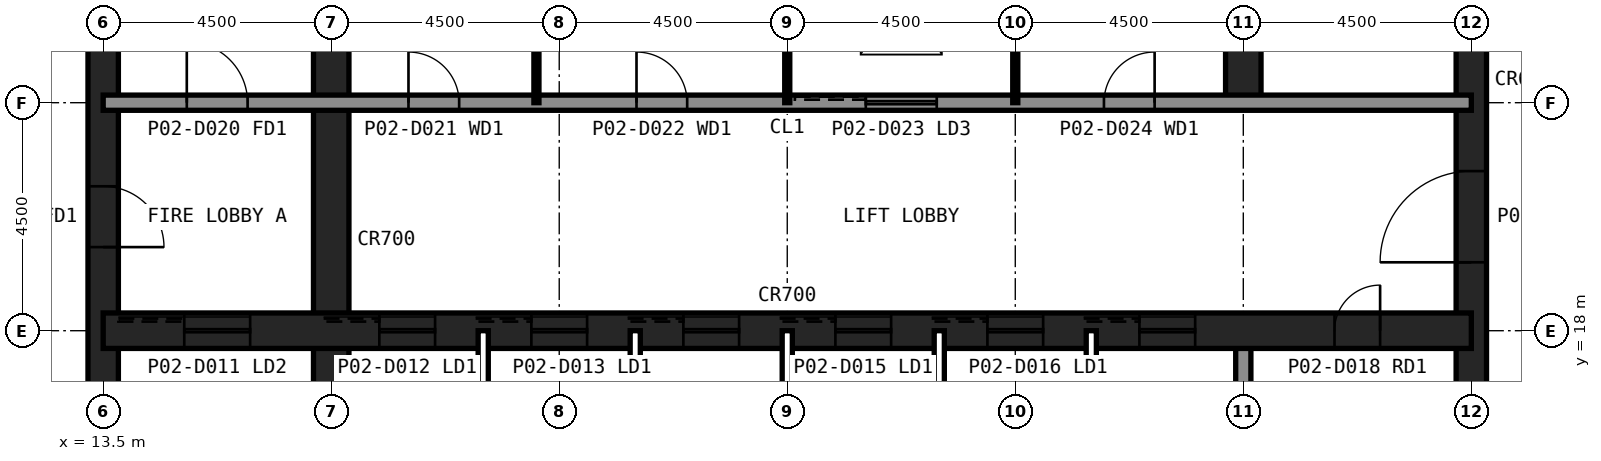
"""IFC4 building model, lengths in metres.
Left out: names, types, materials, properties, quantities, classifications, styles, units other than length and angle.
Written with IfcOpenShell. Run it as: python <this file> out.ifc"""

import sys

from ifc_helpers import new_model, si_unit, direction, frame, frame_2d, origin, place, context, subcontext, project, spatial, rectangle, extrude, element, fill, save


model = new_model("IFC4")
c1 = context("Model", 3, precision=1e-05, world=origin(), true_north=direction((0.0, 1.0)))
c2 = subcontext(c1, "Body", "Model", "MODEL_VIEW")
j1 = project(units=[si_unit("LENGTHUNIT", "METRE"), si_unit("PLANEANGLEUNIT", "RADIAN")], contexts=[c1])
p1 = place(None, origin())
s1 = spatial("IfcSite", under=j1, at=p1, CompositionType="ELEMENT")
p2 = place(p1, origin())
s2 = spatial("IfcBuilding", under=s1, at=p2, CompositionType="ELEMENT")
p3 = place(p2, frame((0.0, 0.0, 6.0)))
s3 = spatial("IfcBuildingStorey", under=s2, at=p3, CompositionType="ELEMENT", Elevation=6.0)
p4 = place(p3, frame((40.5, 13.5, 0.0), z_axis=(0.0, 0.0, 1.0), x_axis=(0.0, 1.0, 0.0)))
e1 = element("IfcWall", 1, at=p4, inside=s3, PredefinedType="SHEAR", context=c2, shape_type="SweptSolid", body=[
    extrude(rectangle(XDim=27.0, YDim=0.6, at=frame_2d((13.5, 0.0))), origin(), (0.0, 0.0, 1.0), 6.0),
])
p5 = place(p4, frame((5.85, 0.0, 0.0)))
e2 = element("IfcOpeningElement", 2, at=p5, cuts=e1, PredefinedType="OPENING", context=c2, shape_type="SweptSolid", body=[
    extrude(rectangle(XDim=1.8, YDim=2.1, at=frame_2d((0.9, 1.05))), frame((0.0, 0.31, 0.0), z_axis=(0.0, -1.0, 0.0), x_axis=(1.0, 0.0, 0.0)), (0.0, 0.0, 1.0), 0.62),
])
p6 = place(p4, frame((19.65, 0.0, 0.0)))
e3 = element("IfcOpeningElement", 3, at=p6, cuts=e1, PredefinedType="OPENING", context=c2, shape_type="SweptSolid", body=[
    extrude(rectangle(XDim=1.2, YDim=2.1, at=frame_2d((0.6, 1.05))), frame((0.0, 0.31, 0.0), z_axis=(0.0, -1.0, 0.0), x_axis=(1.0, 0.0, 0.0)), (0.0, 0.0, 1.0), 0.62),
])
p7 = place(p3, frame((13.5, 40.5, 0.0), z_axis=(0.0, 0.0, 1.0), x_axis=(0.0, -1.0, 0.0)))
e4 = element("IfcWall", 4, at=p7, inside=s3, PredefinedType="SHEAR", context=c2, shape_type="SweptSolid", body=[
    extrude(rectangle(XDim=27.0, YDim=0.6, at=frame_2d((13.5, 0.0))), origin(), (0.0, 0.0, 1.0), 6.0),
])
p8 = place(p7, frame((19.65, 0.0, 0.0)))
e5 = element("IfcOpeningElement", 5, at=p8, cuts=e4, PredefinedType="OPENING", context=c2, shape_type="SweptSolid", body=[
    extrude(rectangle(XDim=1.2, YDim=2.1, at=frame_2d((0.6, 1.05))), frame((0.0, 0.31, 0.0), z_axis=(0.0, -1.0, 0.0), x_axis=(1.0, 0.0, 0.0)), (0.0, 0.0, 1.0), 0.62),
])
p9 = place(p7, frame((5.85, 0.0, 0.0)))
e6 = element("IfcOpeningElement", 6, at=p9, cuts=e4, PredefinedType="OPENING", context=c2, shape_type="SweptSolid", body=[
    extrude(rectangle(XDim=1.8, YDim=2.1, at=frame_2d((0.9, 1.05))), frame((0.0, 0.31, 0.0), z_axis=(0.0, -1.0, 0.0), x_axis=(1.0, 0.0, 0.0)), (0.0, 0.0, 1.0), 0.62),
])
p10 = place(p3, frame((18.0, 13.5, 0.0), z_axis=(0.0, 0.0, 1.0), x_axis=(0.0, 1.0, 0.0)))
e7 = element("IfcWall", 7, at=p10, inside=s3, PredefinedType="SHEAR", context=c2, shape_type="SweptSolid", body=[
    extrude(rectangle(XDim=18.0, YDim=0.7, at=frame_2d((9.0, 0.0))), origin(), (0.0, 0.0, 1.0), 6.0),
])
p11 = place(p3, frame((36.0, 13.5, 0.0), z_axis=(0.0, 0.0, 1.0), x_axis=(0.0, 1.0, 0.0)))
e8 = element("IfcWall", 8, at=p11, inside=s3, PredefinedType="SOLIDWALL", context=c2, shape_type="SweptSolid", body=[
    extrude(rectangle(XDim=4.5, YDim=0.3, at=frame_2d((2.25, 0.0))), origin(), (0.0, 0.0, 1.0), 5.8),
])
p12 = place(p3, frame((36.0, 22.5, 0.0), z_axis=(0.0, 0.0, 1.0), x_axis=(0.0, 1.0, 0.0)))
e9 = element("IfcWall", 9, at=p12, inside=s3, PredefinedType="SHEAR", context=c2, shape_type="SweptSolid", body=[
    extrude(rectangle(XDim=18.0, YDim=0.7, at=frame_2d((9.0, 0.0))), origin(), (0.0, 0.0, 1.0), 6.0),
])
p13 = place(p3, frame((13.5, 18.0, 0.0), z_axis=(0.0, 0.0, 1.0), x_axis=(1.0, 0.0, 0.0)))
e10 = element("IfcWall", 10, at=p13, inside=s3, PredefinedType="SHEAR", context=c2, shape_type="SweptSolid", body=[
    extrude(rectangle(XDim=27.0, YDim=0.7, at=frame_2d((13.5, 0.0))), origin(), (0.0, 0.0, 1.0), 6.0),
])
p14 = place(p13, frame((24.3, 0.0, 0.0)))
e11 = element("IfcOpeningElement", 11, at=p14, cuts=e10, PredefinedType="OPENING", context=c2, shape_type="SweptSolid", body=[
    extrude(rectangle(XDim=0.9, YDim=2.1, at=frame_2d((0.45, 1.05))), frame((0.0, 0.36, 0.0), z_axis=(0.0, -1.0, 0.0), x_axis=(1.0, 0.0, 0.0)), (0.0, 0.0, 1.0), 0.72),
])
p15 = place(p13, frame((5.45, 0.0, 0.0)))
e12 = element("IfcOpeningElement", 12, at=p15, cuts=e10, PredefinedType="OPENING", context=c2, shape_type="SweptSolid", body=[
    extrude(rectangle(XDim=1.1, YDim=2.1, at=frame_2d((0.55, 1.05))), frame((0.0, 0.36, 0.0), z_axis=(0.0, -1.0, 0.0), x_axis=(1.0, 0.0, 0.0)), (0.0, 0.0, 1.0), 0.72),
])
p16 = place(p13, frame((8.45, 0.0, 0.0)))
e13 = element("IfcOpeningElement", 13, at=p16, cuts=e10, PredefinedType="OPENING", context=c2, shape_type="SweptSolid", body=[
    extrude(rectangle(XDim=1.1, YDim=2.1, at=frame_2d((0.55, 1.05))), frame((0.0, 0.36, 0.0), z_axis=(0.0, -1.0, 0.0), x_axis=(1.0, 0.0, 0.0)), (0.0, 0.0, 1.0), 0.72),
])
p17 = place(p13, frame((11.45, 0.0, 0.0)))
e14 = element("IfcOpeningElement", 14, at=p17, cuts=e10, PredefinedType="OPENING", context=c2, shape_type="SweptSolid", body=[
    extrude(rectangle(XDim=1.1, YDim=2.1, at=frame_2d((0.55, 1.05))), frame((0.0, 0.36, 0.0), z_axis=(0.0, -1.0, 0.0), x_axis=(1.0, 0.0, 0.0)), (0.0, 0.0, 1.0), 0.72),
])
p18 = place(p13, frame((14.45, 0.0, 0.0)))
e15 = element("IfcOpeningElement", 15, at=p18, cuts=e10, PredefinedType="OPENING", context=c2, shape_type="SweptSolid", body=[
    extrude(rectangle(XDim=1.1, YDim=2.1, at=frame_2d((0.55, 1.05))), frame((0.0, 0.36, 0.0), z_axis=(0.0, -1.0, 0.0), x_axis=(1.0, 0.0, 0.0)), (0.0, 0.0, 1.0), 0.72),
])
p19 = place(p13, frame((17.45, 0.0, 0.0)))
e16 = element("IfcOpeningElement", 16, at=p19, cuts=e10, PredefinedType="OPENING", context=c2, shape_type="SweptSolid", body=[
    extrude(rectangle(XDim=1.1, YDim=2.1, at=frame_2d((0.55, 1.05))), frame((0.0, 0.36, 0.0), z_axis=(0.0, -1.0, 0.0), x_axis=(1.0, 0.0, 0.0)), (0.0, 0.0, 1.0), 0.72),
])
p20 = place(p13, frame((20.45, 0.0, 0.0)))
e17 = element("IfcOpeningElement", 17, at=p20, cuts=e10, PredefinedType="OPENING", context=c2, shape_type="SweptSolid", body=[
    extrude(rectangle(XDim=1.1, YDim=2.1, at=frame_2d((0.55, 1.05))), frame((0.0, 0.36, 0.0), z_axis=(0.0, -1.0, 0.0), x_axis=(1.0, 0.0, 0.0)), (0.0, 0.0, 1.0), 0.72),
])
p21 = place(p13, frame((1.6, 0.0, 0.0)))
e18 = element("IfcOpeningElement", 18, at=p21, cuts=e10, PredefinedType="OPENING", context=c2, shape_type="SweptSolid", body=[
    extrude(rectangle(XDim=1.3, YDim=2.2, at=frame_2d((0.65, 1.1))), frame((0.0, 0.36, 0.0), z_axis=(0.0, -1.0, 0.0), x_axis=(1.0, 0.0, 0.0)), (0.0, 0.0, 1.0), 0.72),
])
p22 = place(p3, frame((13.5, 22.5, 0.0), z_axis=(0.0, 0.0, 1.0), x_axis=(1.0, 0.0, 0.0)))
e19 = element("IfcWall", 19, at=p22, inside=s3, PredefinedType="SOLIDWALL", context=c2, shape_type="SweptSolid", body=[
    extrude(rectangle(XDim=27.0, YDim=0.3, at=frame_2d((13.5, 0.0))), origin(), (0.0, 0.0, 1.0), 5.8),
])
p23 = place(p22, frame((1.65, 0.0, 0.0)))
e20 = element("IfcOpeningElement", 20, at=p23, cuts=e19, PredefinedType="OPENING", context=c2, shape_type="SweptSolid", body=[
    extrude(rectangle(XDim=1.2, YDim=2.1, at=frame_2d((0.6, 1.05))), frame((0.0, 0.16, 0.0), z_axis=(0.0, -1.0, 0.0), x_axis=(1.0, 0.0, 0.0)), (0.0, 0.0, 1.0), 0.32),
])
p24 = place(p22, frame((6.025, 0.0, 0.0)))
e21 = element("IfcOpeningElement", 21, at=p24, cuts=e19, PredefinedType="OPENING", context=c2, shape_type="SweptSolid", body=[
    extrude(rectangle(XDim=1.0, YDim=2.1, at=frame_2d((0.5, 1.05))), frame((0.0, 0.16, 0.0), z_axis=(0.0, -1.0, 0.0), x_axis=(1.0, 0.0, 0.0)), (0.0, 0.0, 1.0), 0.32),
])
p25 = place(p22, frame((10.525, 0.0, 0.0)))
e22 = element("IfcOpeningElement", 22, at=p25, cuts=e19, PredefinedType="OPENING", context=c2, shape_type="SweptSolid", body=[
    extrude(rectangle(XDim=1.0, YDim=2.1, at=frame_2d((0.5, 1.05))), frame((0.0, 0.16, 0.0), z_axis=(0.0, -1.0, 0.0), x_axis=(1.0, 0.0, 0.0)), (0.0, 0.0, 1.0), 0.32),
])
p26 = place(p22, frame((19.75, 0.0, 0.0)))
e23 = element("IfcOpeningElement", 23, at=p26, cuts=e19, PredefinedType="OPENING", context=c2, shape_type="SweptSolid", body=[
    extrude(rectangle(XDim=1.0, YDim=2.1, at=frame_2d((0.5, 1.05))), frame((0.0, 0.16, 0.0), z_axis=(0.0, -1.0, 0.0), x_axis=(1.0, 0.0, 0.0)), (0.0, 0.0, 1.0), 0.32),
])
p27 = place(p22, frame((15.05, 0.0, 0.0)))
e24 = element("IfcOpeningElement", 24, at=p27, cuts=e19, PredefinedType="OPENING", context=c2, shape_type="SweptSolid", body=[
    extrude(rectangle(XDim=1.4, YDim=2.4, at=frame_2d((0.7, 1.2))), frame((0.0, 0.16, 0.0), z_axis=(0.0, -1.0, 0.0), x_axis=(1.0, 0.0, 0.0)), (0.0, 0.0, 1.0), 0.32),
])
for number, where, z_axis, x_axis in (
    (25, (21.0, 13.5, 0.0), (0.0, 0.0, 1.0), (0.0, 1.0, 0.0)),
    (26, (24.0, 13.5, 0.0), (0.0, 0.0, 1.0), (0.0, 1.0, 0.0)),
    (27, (27.0, 13.5, 0.0), (0.0, 0.0, 1.0), (0.0, 1.0, 0.0)),
    (28, (30.0, 13.5, 0.0), (0.0, 0.0, 1.0), (0.0, 1.0, 0.0)),
    (29, (33.0, 13.5, 0.0), (0.0, 0.0, 1.0), (0.0, 1.0, 0.0)),
):
    element("IfcWall", number, at=place(p3, frame(where, z_axis=z_axis, x_axis=x_axis)), inside=s3, PredefinedType="PARTITIONING", context=c2, shape_type="SweptSolid", body=[
        extrude(rectangle(XDim=4.5, YDim=0.2, at=frame_2d((2.25, 0.0))), origin(), (0.0, 0.0, 1.0), 5.8),
    ])
for number, where, z_axis, x_axis in (
    (30, (22.05, 22.5, 0.0), (0.0, 0.0, 1.0), (0.0, 1.0, 0.0)),
    (31, (27.0, 22.5, 0.0), (0.0, 0.0, 1.0), (0.0, 1.0, 0.0)),
    (32, (31.5, 22.5, 0.0), (0.0, 0.0, 1.0), (0.0, 1.0, 0.0)),
):
    element("IfcWall", number, at=place(p3, frame(where, z_axis=z_axis, x_axis=x_axis)), inside=s3, PredefinedType="PLUMBINGWALL", context=c2, shape_type="SweptSolid", body=[
        extrude(rectangle(XDim=9.0, YDim=0.1, at=frame_2d((4.5, 0.0))), origin(), (0.0, 0.0, 1.0), 5.8),
    ])
p28 = place(p8, origin())
e33 = element("IfcDoor", 33, at=p28, inside=s3, OperationType="SINGLE_SWING_RIGHT", PredefinedType="DOOR", context=c2, shape_type="SweptSolid", body=[
    extrude(rectangle(XDim=1.2, YDim=2.1, at=frame_2d((0.6, 1.05))), frame((0.0, 0.025, 0.0), z_axis=(0.0, -1.0, 0.0), x_axis=(1.0, 0.0, 0.0)), (0.0, 0.0, 1.0), 0.05),
])
fill(e5, e33)
p29 = place(p5, origin())
e34 = element("IfcDoor", 34, at=p29, inside=s3, OperationType="SINGLE_SWING_LEFT", PredefinedType="DOOR", context=c2, shape_type="SweptSolid", body=[
    extrude(rectangle(XDim=1.8, YDim=2.1, at=frame_2d((0.9, 1.05))), frame((0.0, 0.025, 0.0), z_axis=(0.0, -1.0, 0.0), x_axis=(1.0, 0.0, 0.0)), (0.0, 0.0, 1.0), 0.05),
])
fill(e2, e34)
p30 = place(p23, origin())
e35 = element("IfcDoor", 35, at=p30, inside=s3, OperationType="SINGLE_SWING_LEFT", PredefinedType="DOOR", context=c2, shape_type="SweptSolid", body=[
    extrude(rectangle(XDim=1.2, YDim=2.1, at=frame_2d((0.6, 1.05))), frame((0.0, 0.025, 0.0), z_axis=(0.0, -1.0, 0.0), x_axis=(1.0, 0.0, 0.0)), (0.0, 0.0, 1.0), 0.05),
])
fill(e20, e35)
p31 = place(p24, origin())
e36 = element("IfcDoor", 36, at=p31, inside=s3, OperationType="SINGLE_SWING_LEFT", PredefinedType="DOOR", context=c2, shape_type="SweptSolid", body=[
    extrude(rectangle(XDim=1.0, YDim=2.1, at=frame_2d((0.5, 1.05))), frame((0.0, 0.025, 0.0), z_axis=(0.0, -1.0, 0.0), x_axis=(1.0, 0.0, 0.0)), (0.0, 0.0, 1.0), 0.05),
])
fill(e21, e36)
p32 = place(p25, origin())
e37 = element("IfcDoor", 37, at=p32, inside=s3, OperationType="SINGLE_SWING_LEFT", PredefinedType="DOOR", context=c2, shape_type="SweptSolid", body=[
    extrude(rectangle(XDim=1.0, YDim=2.1, at=frame_2d((0.5, 1.05))), frame((0.0, 0.025, 0.0), z_axis=(0.0, -1.0, 0.0), x_axis=(1.0, 0.0, 0.0)), (0.0, 0.0, 1.0), 0.05),
])
fill(e22, e37)
p33 = place(p26, origin())
e38 = element("IfcDoor", 38, at=p33, inside=s3, OperationType="SINGLE_SWING_RIGHT", PredefinedType="DOOR", context=c2, shape_type="SweptSolid", body=[
    extrude(rectangle(XDim=1.0, YDim=2.1, at=frame_2d((0.5, 1.05))), frame((0.0, 0.025, 0.0), z_axis=(0.0, -1.0, 0.0), x_axis=(1.0, 0.0, 0.0)), (0.0, 0.0, 1.0), 0.05),
])
fill(e23, e38)
p34 = place(p14, origin())
e39 = element("IfcDoor", 39, at=p34, inside=s3, OperationType="SINGLE_SWING_RIGHT", PredefinedType="DOOR", context=c2, shape_type="SweptSolid", body=[
    extrude(rectangle(XDim=0.9, YDim=2.1, at=frame_2d((0.45, 1.05))), frame((0.0, 0.025, 0.0), z_axis=(0.0, -1.0, 0.0), x_axis=(1.0, 0.0, 0.0)), (0.0, 0.0, 1.0), 0.05),
])
fill(e11, e39)
p35 = place(p15, origin())
e40 = element("IfcDoor", 40, at=p35, inside=s3, OperationType="SLIDING_TO_LEFT", PredefinedType="DOOR", context=c2, shape_type="SweptSolid", body=[
    extrude(rectangle(XDim=1.1, YDim=2.1, at=frame_2d((0.55, 1.05))), frame((0.0, 0.025, 0.0), z_axis=(0.0, -1.0, 0.0), x_axis=(1.0, 0.0, 0.0)), (0.0, 0.0, 1.0), 0.05),
])
fill(e12, e40)
p36 = place(p16, origin())
e41 = element("IfcDoor", 41, at=p36, inside=s3, OperationType="SLIDING_TO_LEFT", PredefinedType="DOOR", context=c2, shape_type="SweptSolid", body=[
    extrude(rectangle(XDim=1.1, YDim=2.1, at=frame_2d((0.55, 1.05))), frame((0.0, 0.025, 0.0), z_axis=(0.0, -1.0, 0.0), x_axis=(1.0, 0.0, 0.0)), (0.0, 0.0, 1.0), 0.05),
])
fill(e13, e41)
p37 = place(p17, origin())
e42 = element("IfcDoor", 42, at=p37, inside=s3, OperationType="SLIDING_TO_LEFT", PredefinedType="DOOR", context=c2, shape_type="SweptSolid", body=[
    extrude(rectangle(XDim=1.1, YDim=2.1, at=frame_2d((0.55, 1.05))), frame((0.0, 0.025, 0.0), z_axis=(0.0, -1.0, 0.0), x_axis=(1.0, 0.0, 0.0)), (0.0, 0.0, 1.0), 0.05),
])
fill(e14, e42)
p38 = place(p18, origin())
e43 = element("IfcDoor", 43, at=p38, inside=s3, OperationType="SLIDING_TO_LEFT", PredefinedType="DOOR", context=c2, shape_type="SweptSolid", body=[
    extrude(rectangle(XDim=1.1, YDim=2.1, at=frame_2d((0.55, 1.05))), frame((0.0, 0.025, 0.0), z_axis=(0.0, -1.0, 0.0), x_axis=(1.0, 0.0, 0.0)), (0.0, 0.0, 1.0), 0.05),
])
fill(e15, e43)
p39 = place(p19, origin())
e44 = element("IfcDoor", 44, at=p39, inside=s3, OperationType="SLIDING_TO_LEFT", PredefinedType="DOOR", context=c2, shape_type="SweptSolid", body=[
    extrude(rectangle(XDim=1.1, YDim=2.1, at=frame_2d((0.55, 1.05))), frame((0.0, 0.025, 0.0), z_axis=(0.0, -1.0, 0.0), x_axis=(1.0, 0.0, 0.0)), (0.0, 0.0, 1.0), 0.05),
])
fill(e16, e44)
p40 = place(p20, origin())
e45 = element("IfcDoor", 45, at=p40, inside=s3, OperationType="SLIDING_TO_LEFT", PredefinedType="DOOR", context=c2, shape_type="SweptSolid", body=[
    extrude(rectangle(XDim=1.1, YDim=2.1, at=frame_2d((0.55, 1.05))), frame((0.0, 0.025, 0.0), z_axis=(0.0, -1.0, 0.0), x_axis=(1.0, 0.0, 0.0)), (0.0, 0.0, 1.0), 0.05),
])
fill(e17, e45)
p41 = place(p21, origin())
e46 = element("IfcDoor", 46, at=p41, inside=s3, OperationType="SLIDING_TO_LEFT", PredefinedType="DOOR", context=c2, shape_type="SweptSolid", body=[
    extrude(rectangle(XDim=1.3, YDim=2.2, at=frame_2d((0.65, 1.1))), frame((0.0, 0.025, 0.0), z_axis=(0.0, -1.0, 0.0), x_axis=(1.0, 0.0, 0.0)), (0.0, 0.0, 1.0), 0.05),
])
fill(e18, e46)
p42 = place(p27, origin())
e47 = element("IfcDoor", 47, at=p42, inside=s3, OperationType="SLIDING_TO_LEFT", PredefinedType="DOOR", context=c2, shape_type="SweptSolid", body=[
    extrude(rectangle(XDim=1.4, YDim=2.4, at=frame_2d((0.7, 1.2))), frame((0.0, 0.025, 0.0), z_axis=(0.0, -1.0, 0.0), x_axis=(1.0, 0.0, 0.0)), (0.0, 0.0, 1.0), 0.05),
])
fill(e24, e47)
save(model, sys.argv[1])
